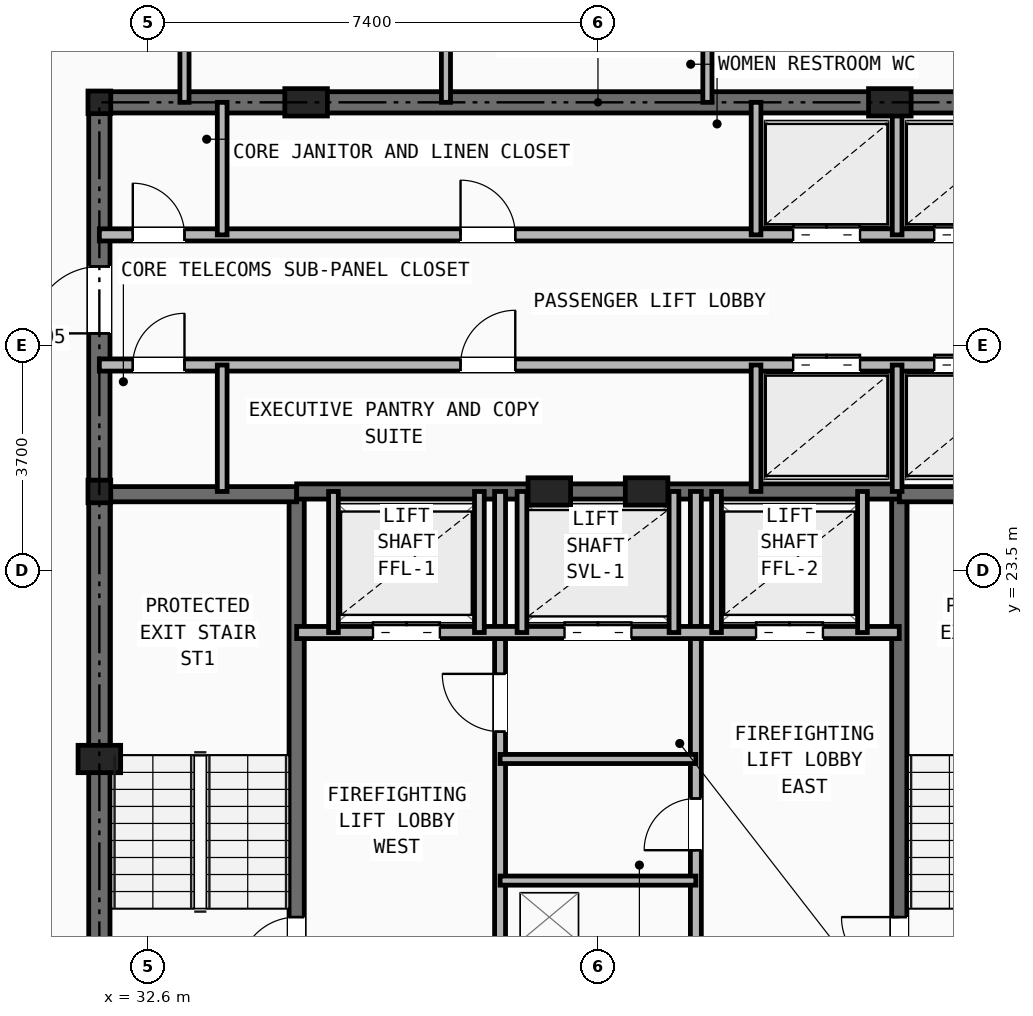
"""IFC4 building model, lengths in metres.
Left out: names, types, materials, properties, quantities, classifications, styles, units other than length and angle.
Written with IfcOpenShell. Run it as: python <this file> out.ifc"""

import sys

from ifc_helpers import new_model, si_unit, direction, frame, frame_2d, origin, origin_2d, place, context, subcontext, project, spatial, rectangle, i_section, extrude, element, fill, save


model = new_model("IFC4")
c1 = context("Model", 3, precision=1e-05, world=origin(), true_north=direction((0.0, 1.0)))
c2 = subcontext(c1, "Body", "Model", "MODEL_VIEW")
j1 = project(units=[si_unit("LENGTHUNIT", "METRE"), si_unit("PLANEANGLEUNIT", "RADIAN")], contexts=[c1])
p1 = place(None, origin())
s1 = spatial("IfcSite", under=j1, at=p1, CompositionType="ELEMENT")
p2 = place(p1, origin())
s2 = spatial("IfcBuilding", under=s1, at=p2, CompositionType="ELEMENT")
p3 = place(p2, frame((0.0, 0.0, 215.4)))
s3 = spatial("IfcBuildingStorey", under=s2, at=p3, CompositionType="ELEMENT", Elevation=215.4)
for number, where, z_axis, x_axis in (
    (1, (31.8, 24.8, 0.0), (0.0, 0.0, 1.0), (1.0, 0.0, 0.0)),
    (2, (31.8, 31.2, 0.0), (0.0, 0.0, 1.0), (1.0, 0.0, 0.0)),
):
    element("IfcColumn", number, at=place(p3, frame(where, z_axis=z_axis, x_axis=x_axis)), inside=s3, PredefinedType="COLUMN", context=c2, shape_type="SweptSolid", body=[
        extrude(i_section(OverallWidth=0.374, OverallDepth=0.372, WebThickness=0.016, FlangeThickness=0.026, at=origin_2d()), origin(), (0.0, 0.0, 1.0), 3.5),
    ])
for number, where, z_axis, x_axis in (
    (3, (31.8, 20.4, 0.0), (0.0, 0.0, 1.0), (1.0, 0.0, 0.0)),
    (4, (35.2, 31.2, 0.0), (0.0, 0.0, 1.0), (1.0, 0.0, 0.0)),
    (5, (44.8, 31.2, 0.0), (0.0, 0.0, 1.0), (1.0, 0.0, 0.0)),
    (6, (39.2, 24.8, 0.0), (0.0, 0.0, 1.0), (1.0, 0.0, 0.0)),
    (7, (40.8, 24.8, 0.0), (0.0, 0.0, 1.0), (1.0, 0.0, 0.0)),
):
    element("IfcColumn", number, at=place(p3, frame(where, z_axis=z_axis, x_axis=x_axis)), inside=s3, PredefinedType="PILASTER", context=c2, shape_type="SweptSolid", body=[
        extrude(rectangle(XDim=0.7, YDim=0.45, at=origin_2d()), origin(), (0.0, 0.0, 1.0), 3.5),
    ])
p4 = place(p3, frame((31.8, 31.2, 0.0), z_axis=(0.0, 0.0, 1.0), x_axis=(1.0, 0.0, 0.0)))
e8 = element("IfcWall", 8, at=p4, inside=s3, PredefinedType="SHEAR", context=c2, shape_type="SweptSolid", body=[
    extrude(rectangle(XDim=16.4, YDim=0.35, at=frame_2d((8.2, 0.0))), origin(), (0.0, 0.0, 1.0), 3.25),
])
p5 = place(p3, frame((31.8, 16.4, 0.0), z_axis=(0.0, 0.0, 1.0), x_axis=(0.0, 1.0, 0.0)))
e9 = element("IfcWall", 9, at=p5, inside=s3, PredefinedType="SHEAR", context=c2, shape_type="SweptSolid", body=[
    extrude(rectangle(XDim=14.8, YDim=0.35, at=frame_2d((7.4, 0.0))), origin(), (0.0, 0.0, 1.0), 3.25),
])
p6 = place(p5, frame((11.0, 0.0, 0.0)))
e10 = element("IfcOpeningElement", 10, at=p6, cuts=e9, PredefinedType="OPENING", context=c2, shape_type="SweptSolid", body=[
    extrude(rectangle(XDim=1.1, YDim=2.15, at=frame_2d((0.55, 1.075))), frame((0.0, 0.185, 0.0), z_axis=(0.0, -1.0, 0.0), x_axis=(1.0, 0.0, 0.0)), (0.0, 0.0, 1.0), 0.37),
])
p7 = place(p3, frame((35.045, 16.4, 0.0), z_axis=(0.0, 0.0, 1.0), x_axis=(0.0, 1.0, 0.0)))
e11 = element("IfcWall", 11, at=p7, inside=s3, PredefinedType="SHEAR", context=c2, shape_type="SweptSolid", body=[
    extrude(rectangle(XDim=8.4, YDim=0.25, at=frame_2d((4.2, 0.0))), origin(), (0.0, 0.0, 1.0), 3.25),
])
p8 = place(p7, frame((0.45, 0.0, 0.0)))
e12 = element("IfcOpeningElement", 12, at=p8, cuts=e11, PredefinedType="OPENING", context=c2, shape_type="SweptSolid", body=[
    extrude(rectangle(XDim=0.95, YDim=2.1, at=frame_2d((0.475, 1.05))), frame((0.0, 0.135, 0.0), z_axis=(0.0, -1.0, 0.0), x_axis=(1.0, 0.0, 0.0)), (0.0, 0.0, 1.0), 0.27),
])
p9 = place(p3, frame((31.8, 24.755, 0.0), z_axis=(0.0, 0.0, 1.0), x_axis=(1.0, 0.0, 0.0)))
e13 = element("IfcWall", 13, at=p9, inside=s3, PredefinedType="SHEAR", context=c2, shape_type="SweptSolid", body=[
    extrude(rectangle(XDim=3.245, YDim=0.25, at=frame_2d((1.623, 0.0))), origin(), (0.0, 0.0, 1.0), 3.25),
])
p10 = place(p3, frame((44.955, 16.4, 0.0), z_axis=(0.0, 0.0, 1.0), x_axis=(0.0, 1.0, 0.0)))
e14 = element("IfcWall", 14, at=p10, inside=s3, PredefinedType="SHEAR", context=c2, shape_type="SweptSolid", body=[
    extrude(rectangle(XDim=8.4, YDim=0.25, at=frame_2d((4.2, 0.0))), origin(), (0.0, 0.0, 1.0), 3.25),
])
p11 = place(p10, frame((0.45, 0.0, 0.0)))
e15 = element("IfcOpeningElement", 15, at=p11, cuts=e14, PredefinedType="OPENING", context=c2, shape_type="SweptSolid", body=[
    extrude(rectangle(XDim=0.95, YDim=2.1, at=frame_2d((0.475, 1.05))), frame((0.0, 0.135, 0.0), z_axis=(0.0, -1.0, 0.0), x_axis=(1.0, 0.0, 0.0)), (0.0, 0.0, 1.0), 0.27),
])
p12 = place(p3, frame((44.955, 24.755, 0.0), z_axis=(0.0, 0.0, 1.0), x_axis=(1.0, 0.0, 0.0)))
e16 = element("IfcWall", 16, at=p12, inside=s3, PredefinedType="SHEAR", context=c2, shape_type="SweptSolid", body=[
    extrude(rectangle(XDim=3.245, YDim=0.25, at=frame_2d((1.623, 0.0))), origin(), (0.0, 0.0, 1.0), 3.25),
])
p13 = place(p3, frame((35.045, 24.8, 0.0), z_axis=(0.0, 0.0, 1.0), x_axis=(1.0, 0.0, 0.0)))
e17 = element("IfcWall", 17, at=p13, inside=s3, PredefinedType="SHEAR", context=c2, shape_type="SweptSolid", body=[
    extrude(rectangle(XDim=9.91, YDim=0.25, at=frame_2d((4.955, 0.0))), origin(), (0.0, 0.0, 1.0), 3.25),
])
p14 = place(p3, frame((38.39, 16.4, 0.0), z_axis=(0.0, 0.0, 1.0), x_axis=(0.0, 1.0, 0.0)))
e18 = element("IfcWall", 18, at=p14, inside=s3, PredefinedType="PARTITIONING", context=c2, shape_type="SweptSolid", body=[
    extrude(rectangle(XDim=8.4, YDim=0.18, at=frame_2d((4.2, 0.0))), origin(), (0.0, 0.0, 1.0), 2.705),
])
p15 = place(p14, frame((4.45, 0.0, 0.0)))
e19 = element("IfcOpeningElement", 19, at=p15, cuts=e18, PredefinedType="OPENING", context=c2, shape_type="SweptSolid", body=[
    extrude(rectangle(XDim=0.95, YDim=2.1, at=frame_2d((0.475, 1.05))), frame((0.0, 0.1, 0.0), z_axis=(0.0, -1.0, 0.0), x_axis=(1.0, 0.0, 0.0)), (0.0, 0.0, 1.0), 0.2),
])
p16 = place(p3, frame((41.61, 16.4, 0.0), z_axis=(0.0, 0.0, 1.0), x_axis=(0.0, 1.0, 0.0)))
e20 = element("IfcWall", 20, at=p16, inside=s3, PredefinedType="PARTITIONING", context=c2, shape_type="SweptSolid", body=[
    extrude(rectangle(XDim=8.4, YDim=0.18, at=frame_2d((4.2, 0.0))), origin(), (0.0, 0.0, 1.0), 2.705),
])
p17 = place(p16, frame((2.5, 0.0, 0.0)))
e21 = element("IfcOpeningElement", 21, at=p17, cuts=e20, PredefinedType="OPENING", context=c2, shape_type="SweptSolid", body=[
    extrude(rectangle(XDim=0.85, YDim=2.05, at=frame_2d((0.425, 1.025))), frame((0.0, 0.1, 0.0), z_axis=(0.0, -1.0, 0.0), x_axis=(1.0, 0.0, 0.0)), (0.0, 0.0, 1.0), 0.2),
])
p18 = place(p3, frame((35.045, 22.48, 0.0), z_axis=(0.0, 0.0, 1.0), x_axis=(1.0, 0.0, 0.0)))
e22 = element("IfcWall", 22, at=p18, inside=s3, PredefinedType="SOLIDWALL", context=c2, shape_type="SweptSolid", body=[
    extrude(rectangle(XDim=9.91, YDim=0.2, at=frame_2d((4.955, 0.0))), origin(), (0.0, 0.0, 1.0), 3.25),
])
p19 = place(p18, frame((1.255, 0.0, 0.0)))
e23 = element("IfcOpeningElement", 23, at=p19, cuts=e22, PredefinedType="OPENING", context=c2, shape_type="SweptSolid", body=[
    extrude(rectangle(XDim=1.1, YDim=2.15, at=frame_2d((0.55, 1.075))), frame((0.0, 0.11, 0.0), z_axis=(0.0, -1.0, 0.0), x_axis=(1.0, 0.0, 0.0)), (0.0, 0.0, 1.0), 0.22),
])
p20 = place(p18, frame((7.555, 0.0, 0.0)))
e24 = element("IfcOpeningElement", 24, at=p20, cuts=e22, PredefinedType="OPENING", context=c2, shape_type="SweptSolid", body=[
    extrude(rectangle(XDim=1.1, YDim=2.15, at=frame_2d((0.55, 1.075))), frame((0.0, 0.11, 0.0), z_axis=(0.0, -1.0, 0.0), x_axis=(1.0, 0.0, 0.0)), (0.0, 0.0, 1.0), 0.22),
])
p21 = place(p18, frame((4.405, 0.0, 0.0)))
e25 = element("IfcOpeningElement", 25, at=p21, cuts=e22, PredefinedType="OPENING", context=c2, shape_type="SweptSolid", body=[
    extrude(rectangle(XDim=1.1, YDim=2.15, at=frame_2d((0.55, 1.075))), frame((0.0, 0.11, 0.0), z_axis=(0.0, -1.0, 0.0), x_axis=(1.0, 0.0, 0.0)), (0.0, 0.0, 1.0), 0.22),
])
for number, where, z_axis, x_axis in (
    (26, (38.39, 18.4, 0.0), (0.0, 0.0, 1.0), (1.0, 0.0, 0.0)),
    (27, (38.39, 20.4, 0.0), (0.0, 0.0, 1.0), (1.0, 0.0, 0.0)),
):
    element("IfcWall", number, at=place(p3, frame(where, z_axis=z_axis, x_axis=x_axis)), inside=s3, PredefinedType="PARTITIONING", context=c2, shape_type="SweptSolid", body=[
        extrude(rectangle(XDim=3.22, YDim=0.15, at=frame_2d((1.61, 0.0))), origin(), (0.0, 0.0, 1.0), 3.25),
    ])
for number, where, z_axis, x_axis in (
    (28, (35.65, 22.48, 0.0), (0.0, 0.0, 1.0), (0.0, 1.0, 0.0)),
    (29, (38.05, 22.48, 0.0), (0.0, 0.0, 1.0), (0.0, 1.0, 0.0)),
    (30, (41.95, 22.48, 0.0), (0.0, 0.0, 1.0), (0.0, 1.0, 0.0)),
    (31, (44.35, 22.48, 0.0), (0.0, 0.0, 1.0), (0.0, 1.0, 0.0)),
    (32, (38.75, 22.48, 0.0), (0.0, 0.0, 1.0), (0.0, 1.0, 0.0)),
    (33, (41.25, 22.48, 0.0), (0.0, 0.0, 1.0), (0.0, 1.0, 0.0)),
):
    element("IfcWall", number, at=place(p3, frame(where, z_axis=z_axis, x_axis=x_axis)), inside=s3, PredefinedType="SOLIDWALL", context=c2, shape_type="SweptSolid", body=[
        extrude(rectangle(XDim=2.32, YDim=0.16, at=frame_2d((1.16, 0.0))), origin(), (0.0, 0.0, 1.0), 3.25),
    ])
p22 = place(p3, frame((31.8, 29.02, 0.0), z_axis=(0.0, 0.0, 1.0), x_axis=(1.0, 0.0, 0.0)))
e34 = element("IfcWall", 34, at=p22, inside=s3, PredefinedType="SOLIDWALL", context=c2, shape_type="SweptSolid", body=[
    extrude(rectangle(XDim=16.4, YDim=0.2, at=frame_2d((8.2, 0.0))), origin(), (0.0, 0.0, 1.0), 2.705),
])
p23 = place(p22, frame((0.55, 0.0, 0.0)))
e35 = element("IfcOpeningElement", 35, at=p23, cuts=e34, PredefinedType="OPENING", context=c2, shape_type="SweptSolid", body=[
    extrude(rectangle(XDim=0.85, YDim=2.05, at=frame_2d((0.425, 1.025))), frame((0.0, 0.11, 0.0), z_axis=(0.0, -1.0, 0.0), x_axis=(1.0, 0.0, 0.0)), (0.0, 0.0, 1.0), 0.22),
])
p24 = place(p22, frame((5.94, 0.0, 0.0)))
e36 = element("IfcOpeningElement", 36, at=p24, cuts=e34, PredefinedType="OPENING", context=c2, shape_type="SweptSolid", body=[
    extrude(rectangle(XDim=0.9, YDim=2.1, at=frame_2d((0.45, 1.05))), frame((0.0, 0.11, 0.0), z_axis=(0.0, -1.0, 0.0), x_axis=(1.0, 0.0, 0.0)), (0.0, 0.0, 1.0), 0.22),
])
p25 = place(p22, frame((11.41, 0.0, 0.0)))
e37 = element("IfcOpeningElement", 37, at=p25, cuts=e34, PredefinedType="OPENING", context=c2, shape_type="SweptSolid", body=[
    extrude(rectangle(XDim=1.1, YDim=2.15, at=frame_2d((0.55, 1.075))), frame((0.0, 0.11, 0.0), z_axis=(0.0, -1.0, 0.0), x_axis=(1.0, 0.0, 0.0)), (0.0, 0.0, 1.0), 0.22),
])
p26 = place(p22, frame((13.73, 0.0, 0.0)))
e38 = element("IfcOpeningElement", 38, at=p26, cuts=e34, PredefinedType="OPENING", context=c2, shape_type="SweptSolid", body=[
    extrude(rectangle(XDim=1.1, YDim=2.15, at=frame_2d((0.55, 1.075))), frame((0.0, 0.11, 0.0), z_axis=(0.0, -1.0, 0.0), x_axis=(1.0, 0.0, 0.0)), (0.0, 0.0, 1.0), 0.22),
])
p27 = place(p3, frame((31.8, 26.88, 0.0), z_axis=(0.0, 0.0, 1.0), x_axis=(1.0, 0.0, 0.0)))
e39 = element("IfcWall", 39, at=p27, inside=s3, PredefinedType="SOLIDWALL", context=c2, shape_type="SweptSolid", body=[
    extrude(rectangle(XDim=16.4, YDim=0.2, at=frame_2d((8.2, 0.0))), origin(), (0.0, 0.0, 1.0), 2.705),
])
p28 = place(p27, frame((0.55, 0.0, 0.0)))
e40 = element("IfcOpeningElement", 40, at=p28, cuts=e39, PredefinedType="OPENING", context=c2, shape_type="SweptSolid", body=[
    extrude(rectangle(XDim=0.85, YDim=2.05, at=frame_2d((0.425, 1.025))), frame((0.0, 0.11, 0.0), z_axis=(0.0, -1.0, 0.0), x_axis=(1.0, 0.0, 0.0)), (0.0, 0.0, 1.0), 0.22),
])
p29 = place(p27, frame((5.94, 0.0, 0.0)))
e41 = element("IfcOpeningElement", 41, at=p29, cuts=e39, PredefinedType="OPENING", context=c2, shape_type="SweptSolid", body=[
    extrude(rectangle(XDim=0.9, YDim=2.1, at=frame_2d((0.45, 1.05))), frame((0.0, 0.11, 0.0), z_axis=(0.0, -1.0, 0.0), x_axis=(1.0, 0.0, 0.0)), (0.0, 0.0, 1.0), 0.22),
])
p30 = place(p27, frame((11.41, 0.0, 0.0)))
e42 = element("IfcOpeningElement", 42, at=p30, cuts=e39, PredefinedType="OPENING", context=c2, shape_type="SweptSolid", body=[
    extrude(rectangle(XDim=1.1, YDim=2.15, at=frame_2d((0.55, 1.075))), frame((0.0, 0.11, 0.0), z_axis=(0.0, -1.0, 0.0), x_axis=(1.0, 0.0, 0.0)), (0.0, 0.0, 1.0), 0.22),
])
p31 = place(p27, frame((13.73, 0.0, 0.0)))
e43 = element("IfcOpeningElement", 43, at=p31, cuts=e39, PredefinedType="OPENING", context=c2, shape_type="SweptSolid", body=[
    extrude(rectangle(XDim=1.1, YDim=2.15, at=frame_2d((0.55, 1.075))), frame((0.0, 0.11, 0.0), z_axis=(0.0, -1.0, 0.0), x_axis=(1.0, 0.0, 0.0)), (0.0, 0.0, 1.0), 0.22),
])
p32 = place(p3, frame((33.82, 29.02, 0.0), z_axis=(0.0, 0.0, 1.0), x_axis=(0.0, 1.0, 0.0)))
e44 = element("IfcWall", 44, at=p32, inside=s3, PredefinedType="SOLIDWALL", context=c2, shape_type="SweptSolid", body=[
    extrude(rectangle(XDim=2.18, YDim=0.16, at=frame_2d((1.09, 0.0))), origin(), (0.0, 0.0, 1.0), 2.705),
])
p33 = place(p3, frame((33.82, 24.8, 0.0), z_axis=(0.0, 0.0, 1.0), x_axis=(0.0, 1.0, 0.0)))
e45 = element("IfcWall", 45, at=p33, inside=s3, PredefinedType="SOLIDWALL", context=c2, shape_type="SweptSolid", body=[
    extrude(rectangle(XDim=2.08, YDim=0.16, at=frame_2d((1.04, 0.0))), origin(), (0.0, 0.0, 1.0), 3.25),
])
for number, where, z_axis, x_axis in (
    (46, (42.6, 29.02, 0.0), (0.0, 0.0, 1.0), (0.0, 1.0, 0.0)),
    (47, (44.92, 29.02, 0.0), (0.0, 0.0, 1.0), (0.0, 1.0, 0.0)),
):
    element("IfcWall", number, at=place(p3, frame(where, z_axis=z_axis, x_axis=x_axis)), inside=s3, PredefinedType="SOLIDWALL", context=c2, shape_type="SweptSolid", body=[
        extrude(rectangle(XDim=2.18, YDim=0.16, at=frame_2d((1.09, 0.0))), origin(), (0.0, 0.0, 1.0), 2.705),
    ])
for number, where, z_axis, x_axis in (
    (48, (42.6, 24.8, 0.0), (0.0, 0.0, 1.0), (0.0, 1.0, 0.0)),
    (49, (44.92, 24.8, 0.0), (0.0, 0.0, 1.0), (0.0, 1.0, 0.0)),
):
    element("IfcWall", number, at=place(p3, frame(where, z_axis=z_axis, x_axis=x_axis)), inside=s3, PredefinedType="SOLIDWALL", context=c2, shape_type="SweptSolid", body=[
        extrude(rectangle(XDim=2.08, YDim=0.16, at=frame_2d((1.04, 0.0))), origin(), (0.0, 0.0, 1.0), 3.25),
    ])
for number, where, z_axis, x_axis in (
    (50, (33.2, 31.2, 0.0), (0.0, 0.0, 1.0), (0.0, 1.0, 0.0)),
    (51, (37.5, 31.2, 0.0), (0.0, 0.0, 1.0), (0.0, 1.0, 0.0)),
    (52, (41.8, 31.2, 0.0), (0.0, 0.0, 1.0), (0.0, 1.0, 0.0)),
):
    element("IfcWall", number, at=place(p3, frame(where, z_axis=z_axis, x_axis=x_axis)), inside=s3, PredefinedType="PARTITIONING", context=c2, shape_type="SweptSolid", body=[
        extrude(rectangle(XDim=2.6, YDim=0.15, at=frame_2d((1.3, 0.0))), origin(), (0.0, 0.0, 1.0), 2.705),
    ])
p34 = place(p17, origin())
e53 = element("IfcDoor", 53, at=p34, inside=s3, OperationType="SINGLE_SWING_LEFT", PredefinedType="DOOR", context=c2, shape_type="SweptSolid", body=[
    extrude(rectangle(XDim=0.85, YDim=2.05, at=frame_2d((0.425, 1.025))), frame((0.0, 0.025, 0.0), z_axis=(0.0, -1.0, 0.0), x_axis=(1.0, 0.0, 0.0)), (0.0, 0.0, 1.0), 0.05),
])
fill(e21, e53)
p35 = place(p15, origin())
e54 = element("IfcDoor", 54, at=p35, inside=s3, OperationType="SINGLE_SWING_RIGHT", PredefinedType="DOOR", context=c2, shape_type="SweptSolid", body=[
    extrude(rectangle(XDim=0.95, YDim=2.1, at=frame_2d((0.475, 1.05))), frame((0.0, 0.025, 0.0), z_axis=(0.0, -1.0, 0.0), x_axis=(1.0, 0.0, 0.0)), (0.0, 0.0, 1.0), 0.05),
])
fill(e19, e54)
p36 = place(p8, origin())
e55 = element("IfcDoor", 55, at=p36, inside=s3, OperationType="SINGLE_SWING_LEFT", PredefinedType="DOOR", context=c2, shape_type="SweptSolid", body=[
    extrude(rectangle(XDim=0.95, YDim=2.1, at=frame_2d((0.475, 1.05))), frame((0.0, 0.025, 0.0), z_axis=(0.0, -1.0, 0.0), x_axis=(1.0, 0.0, 0.0)), (0.0, 0.0, 1.0), 0.05),
])
fill(e12, e55)
p37 = place(p11, origin())
e56 = element("IfcDoor", 56, at=p37, inside=s3, OperationType="SINGLE_SWING_RIGHT", PredefinedType="DOOR", context=c2, shape_type="SweptSolid", body=[
    extrude(rectangle(XDim=0.95, YDim=2.1, at=frame_2d((0.475, 1.05))), frame((0.0, 0.025, 0.0), z_axis=(0.0, -1.0, 0.0), x_axis=(1.0, 0.0, 0.0)), (0.0, 0.0, 1.0), 0.05),
])
fill(e15, e56)
p38 = place(p19, origin())
e57 = element("IfcDoor", 57, at=p38, inside=s3, OperationType="DOUBLE_DOOR_SLIDING", PredefinedType="DOOR", context=c2, shape_type="SweptSolid", body=[
    extrude(rectangle(XDim=1.1, YDim=2.15, at=frame_2d((0.55, 1.075))), frame((0.0, 0.025, 0.0), z_axis=(0.0, -1.0, 0.0), x_axis=(1.0, 0.0, 0.0)), (0.0, 0.0, 1.0), 0.05),
])
fill(e23, e57)
p39 = place(p20, origin())
e58 = element("IfcDoor", 58, at=p39, inside=s3, OperationType="DOUBLE_DOOR_SLIDING", PredefinedType="DOOR", context=c2, shape_type="SweptSolid", body=[
    extrude(rectangle(XDim=1.1, YDim=2.15, at=frame_2d((0.55, 1.075))), frame((0.0, 0.025, 0.0), z_axis=(0.0, -1.0, 0.0), x_axis=(1.0, 0.0, 0.0)), (0.0, 0.0, 1.0), 0.05),
])
fill(e24, e58)
p40 = place(p21, origin())
e59 = element("IfcDoor", 59, at=p40, inside=s3, OperationType="DOUBLE_DOOR_SLIDING", PredefinedType="DOOR", context=c2, shape_type="SweptSolid", body=[
    extrude(rectangle(XDim=1.1, YDim=2.15, at=frame_2d((0.55, 1.075))), frame((0.0, 0.025, 0.0), z_axis=(0.0, -1.0, 0.0), x_axis=(1.0, 0.0, 0.0)), (0.0, 0.0, 1.0), 0.05),
])
fill(e25, e59)
p41 = place(p23, origin())
e60 = element("IfcDoor", 60, at=p41, inside=s3, OperationType="SINGLE_SWING_LEFT", PredefinedType="DOOR", context=c2, shape_type="SweptSolid", body=[
    extrude(rectangle(XDim=0.85, YDim=2.05, at=frame_2d((0.425, 1.025))), frame((0.0, 0.025, 0.0), z_axis=(0.0, -1.0, 0.0), x_axis=(1.0, 0.0, 0.0)), (0.0, 0.0, 1.0), 0.05),
])
fill(e35, e60)
p42 = place(p28, origin())
e61 = element("IfcDoor", 61, at=p42, inside=s3, OperationType="SINGLE_SWING_RIGHT", PredefinedType="DOOR", context=c2, shape_type="SweptSolid", body=[
    extrude(rectangle(XDim=0.85, YDim=2.05, at=frame_2d((0.425, 1.025))), frame((0.0, 0.025, 0.0), z_axis=(0.0, -1.0, 0.0), x_axis=(1.0, 0.0, 0.0)), (0.0, 0.0, 1.0), 0.05),
])
fill(e40, e61)
p43 = place(p6, origin())
e62 = element("IfcDoor", 62, at=p43, inside=s3, OperationType="SINGLE_SWING_LEFT", PredefinedType="DOOR", context=c2, shape_type="SweptSolid", body=[
    extrude(rectangle(XDim=1.1, YDim=2.15, at=frame_2d((0.55, 1.075))), frame((0.0, 0.025, 0.0), z_axis=(0.0, -1.0, 0.0), x_axis=(1.0, 0.0, 0.0)), (0.0, 0.0, 1.0), 0.05),
])
fill(e10, e62)
p44 = place(p24, origin())
e63 = element("IfcDoor", 63, at=p44, inside=s3, OperationType="SINGLE_SWING_LEFT", PredefinedType="DOOR", context=c2, shape_type="SweptSolid", body=[
    extrude(rectangle(XDim=0.9, YDim=2.1, at=frame_2d((0.45, 1.05))), frame((0.0, 0.025, 0.0), z_axis=(0.0, -1.0, 0.0), x_axis=(1.0, 0.0, 0.0)), (0.0, 0.0, 1.0), 0.05),
])
fill(e36, e63)
p45 = place(p29, origin())
e64 = element("IfcDoor", 64, at=p45, inside=s3, OperationType="SINGLE_SWING_RIGHT", PredefinedType="DOOR", context=c2, shape_type="SweptSolid", body=[
    extrude(rectangle(XDim=0.9, YDim=2.1, at=frame_2d((0.45, 1.05))), frame((0.0, 0.025, 0.0), z_axis=(0.0, -1.0, 0.0), x_axis=(1.0, 0.0, 0.0)), (0.0, 0.0, 1.0), 0.05),
])
fill(e41, e64)
p46 = place(p25, origin())
e65 = element("IfcDoor", 65, at=p46, inside=s3, OperationType="DOUBLE_DOOR_SLIDING", PredefinedType="DOOR", context=c2, shape_type="SweptSolid", body=[
    extrude(rectangle(XDim=1.1, YDim=2.15, at=frame_2d((0.55, 1.075))), frame((0.0, 0.025, 0.0), z_axis=(0.0, -1.0, 0.0), x_axis=(1.0, 0.0, 0.0)), (0.0, 0.0, 1.0), 0.05),
])
fill(e37, e65)
p47 = place(p26, origin())
e66 = element("IfcDoor", 66, at=p47, inside=s3, OperationType="DOUBLE_DOOR_SLIDING", PredefinedType="DOOR", context=c2, shape_type="SweptSolid", body=[
    extrude(rectangle(XDim=1.1, YDim=2.15, at=frame_2d((0.55, 1.075))), frame((0.0, 0.025, 0.0), z_axis=(0.0, -1.0, 0.0), x_axis=(1.0, 0.0, 0.0)), (0.0, 0.0, 1.0), 0.05),
])
fill(e38, e66)
p48 = place(p30, origin())
e67 = element("IfcDoor", 67, at=p48, inside=s3, OperationType="DOUBLE_DOOR_SLIDING", PredefinedType="DOOR", context=c2, shape_type="SweptSolid", body=[
    extrude(rectangle(XDim=1.1, YDim=2.15, at=frame_2d((0.55, 1.075))), frame((0.0, 0.025, 0.0), z_axis=(0.0, -1.0, 0.0), x_axis=(1.0, 0.0, 0.0)), (0.0, 0.0, 1.0), 0.05),
])
fill(e42, e67)
p49 = place(p31, origin())
e68 = element("IfcDoor", 68, at=p49, inside=s3, OperationType="DOUBLE_DOOR_SLIDING", PredefinedType="DOOR", context=c2, shape_type="SweptSolid", body=[
    extrude(rectangle(XDim=1.1, YDim=2.15, at=frame_2d((0.55, 1.075))), frame((0.0, 0.025, 0.0), z_axis=(0.0, -1.0, 0.0), x_axis=(1.0, 0.0, 0.0)), (0.0, 0.0, 1.0), 0.05),
])
fill(e43, e68)
save(model, sys.argv[1])
